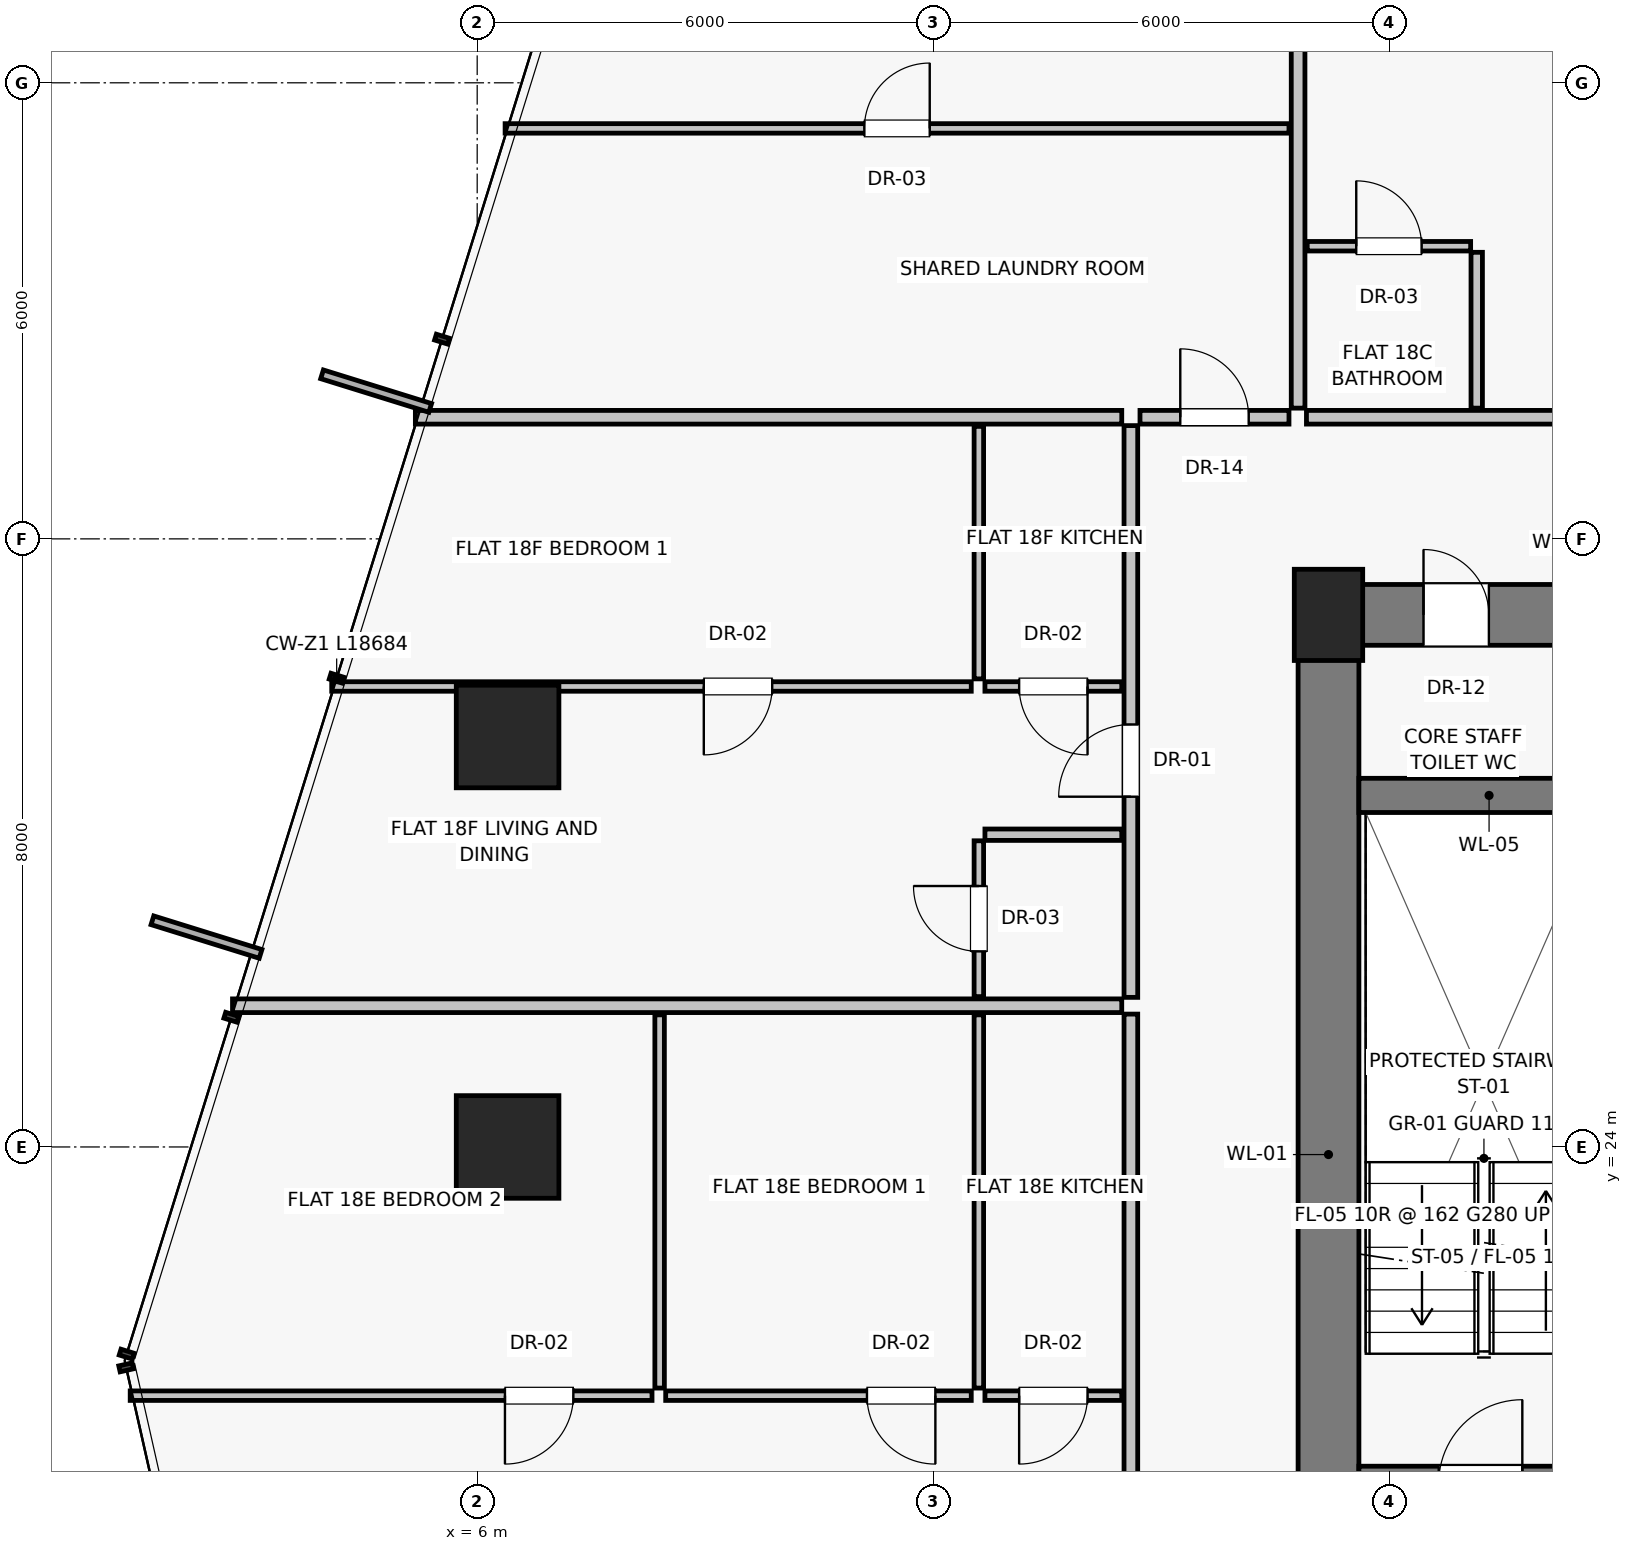
"""IFC4 building model, lengths in metres.
Left out: names, types, materials, properties, quantities, classifications, styles, units other than length and angle.
Written with IfcOpenShell. Run it as: python <this file> out.ifc"""

import sys

from ifc_helpers import new_model, si_unit, direction, frame, frame_2d, origin, origin_2d, place, context, subcontext, project, spatial, rectangle, extrude, source, transform, mapped, element, fill, save


model = new_model("IFC4")
c1 = context("Model", 3, precision=1e-05, world=origin(), true_north=direction((0.0, 1.0)))
c2 = subcontext(c1, "Body", "Model", "MODEL_VIEW")
j1 = project(units=[si_unit("LENGTHUNIT", "METRE"), si_unit("PLANEANGLEUNIT", "RADIAN")], contexts=[c1])
p1 = place(None, origin())
s1 = spatial("IfcSite", under=j1, at=p1, CompositionType="ELEMENT")
p2 = place(p1, origin())
s2 = spatial("IfcBuilding", under=s1, at=p2, CompositionType="ELEMENT")
p3 = place(p2, frame((0.0, 0.0, 67.35)))
s3 = spatial("IfcBuildingStorey", under=s2, at=p3, CompositionType="ELEMENT", Elevation=67.35)
p4 = place(p3, frame((17.2, 31.0, 0.0), z_axis=(0.0, 0.0, 1.0), x_axis=(1.0, 0.0, 0.0)))
e1 = element("IfcColumn", 1, at=p4, inside=s3, PredefinedType="PILASTER", context=c2, shape_type="SweptSolid", body=[
    extrude(rectangle(XDim=0.9, YDim=1.2, at=origin_2d()), origin(), (0.0, 0.0, 1.0), 3.25),
])
for number, where, z_axis, x_axis in (
    (2, (6.4, 29.4, 0.0), (0.0, 0.0, 1.0), (1.0, 0.0, 0.0)),
    (3, (6.4, 24.0, 0.0), (0.0, 0.0, 1.0), (1.0, 0.0, 0.0)),
):
    element("IfcColumn", number, at=place(p3, frame(where, z_axis=z_axis, x_axis=x_axis)), inside=s3, PredefinedType="COLUMN", context=c2, shape_type="SweptSolid", body=[
        extrude(rectangle(XDim=1.35, YDim=1.35, at=origin_2d()), origin(), (0.0, 0.0, 1.0), 3.25),
    ])
p5 = place(p3, frame((17.2, 16.8, 0.0), z_axis=(0.0, 0.0, 1.0), x_axis=(0.0, 1.0, 0.0)))
e4 = element("IfcWall", 4, at=p5, inside=s3, PredefinedType="SHEAR", context=c2, shape_type="SweptSolid", body=[
    extrude(rectangle(XDim=14.2, YDim=0.8, at=frame_2d((7.1, 0.0))), origin(), (0.0, 0.0, 1.0), 3.0),
])
p6 = place(p3, frame((17.2, 31.0, 0.0), z_axis=(0.0, 0.0, 1.0), x_axis=(1.0, 0.0, 0.0)))
e5 = element("IfcWall", 5, at=p6, inside=s3, PredefinedType="SHEAR", context=c2, shape_type="SweptSolid", body=[
    extrude(rectangle(XDim=3.8, YDim=0.8, at=frame_2d((1.9, 0.0))), origin(), (0.0, 0.0, 1.0), 3.0),
])
p7 = place(p6, frame((1.25, 0.0, 0.0)))
e6 = element("IfcOpeningElement", 6, at=p7, cuts=e5, PredefinedType="OPENING", context=c2, shape_type="SweptSolid", body=[
    extrude(rectangle(XDim=0.86, YDim=2.01, at=frame_2d((0.43, 1.005))), frame((0.0, 0.41, 0.0), z_axis=(0.0, -1.0, 0.0), x_axis=(1.0, 0.0, 0.0)), (0.0, 0.0, 1.0), 0.82),
])
p8 = place(p3, frame((17.6, 19.575, 0.0), z_axis=(0.0, 0.0, 1.0), x_axis=(1.0, 0.0, 0.0)))
e7 = element("IfcWall", 7, at=p8, inside=s3, PredefinedType="SHEAR", context=c2, shape_type="SweptSolid", body=[
    extrude(rectangle(XDim=3.425, YDim=0.45, at=frame_2d((1.712, 0.0))), origin(), (0.0, 0.0, 1.0), 3.0),
])
p9 = place(p8, frame((1.05, 0.0, 0.0)))
e8 = element("IfcOpeningElement", 8, at=p9, cuts=e7, PredefinedType="OPENING", context=c2, shape_type="SweptSolid", body=[
    extrude(rectangle(XDim=1.1, YDim=2.03, at=frame_2d((0.55, 1.015))), frame((0.0, 0.235, 0.0), z_axis=(0.0, -1.0, 0.0), x_axis=(1.0, 0.0, 0.0)), (0.0, 0.0, 1.0), 0.47),
])
p10 = place(p3, frame((17.6, 28.625, 0.0), z_axis=(0.0, 0.0, 1.0), x_axis=(1.0, 0.0, 0.0)))
e9 = element("IfcWall", 9, at=p10, inside=s3, PredefinedType="SHEAR", context=c2, shape_type="SweptSolid", body=[
    extrude(rectangle(XDim=3.425, YDim=0.45, at=frame_2d((1.712, 0.0))), origin(), (0.0, 0.0, 1.0), 3.0),
])
p11 = place(p3, frame((16.8, 33.72, 0.0), z_axis=(0.0, 0.0, 1.0), x_axis=(0.0, 1.0, 0.0)))
e10 = element("IfcWall", 10, at=p11, inside=s3, PredefinedType="PARTITIONING", context=c2, shape_type="SweptSolid", body=[
    extrude(rectangle(XDim=9.992, YDim=0.18, at=frame_2d((4.996, 0.0))), origin(), (0.0, 0.0, 1.0), 3.0),
])
p12 = place(p3, frame((16.91, 33.6, 0.0), z_axis=(0.0, 0.0, 1.0), x_axis=(1.0, 0.0, 0.0)))
e11 = element("IfcWall", 11, at=p12, inside=s3, PredefinedType="PARTITIONING", context=c2, shape_type="SweptSolid", body=[
    extrude(rectangle(XDim=5.638, YDim=0.18, at=frame_2d((2.819, 0.0))), origin(), (0.0, 0.0, 1.0), 3.0),
])
p13 = place(p12, frame((3.373, 0.0, 0.0)))
e12 = element("IfcOpeningElement", 12, at=p13, cuts=e11, PredefinedType="OPENING", context=c2, shape_type="SweptSolid", body=[
    extrude(rectangle(XDim=0.95, YDim=2.02, at=frame_2d((0.475, 1.01))), frame((0.0, 0.1, 0.0), z_axis=(0.0, -1.0, 0.0), x_axis=(1.0, 0.0, 0.0)), (0.0, 0.0, 1.0), 0.2),
])
p14 = place(p3, frame((19.15, 33.72, 0.0), z_axis=(0.0, 0.0, 1.0), x_axis=(0.0, 1.0, 0.0)))
e13 = element("IfcWall", 13, at=p14, inside=s3, PredefinedType="PARTITIONING", context=c2, shape_type="SweptSolid", body=[
    extrude(rectangle(XDim=2.05, YDim=0.15, at=frame_2d((1.025, 0.0))), origin(), (0.0, 0.0, 1.0), 3.0),
])
p15 = place(p3, frame((16.92, 35.85, 0.0), z_axis=(0.0, 0.0, 1.0), x_axis=(1.0, 0.0, 0.0)))
e14 = element("IfcWall", 14, at=p15, inside=s3, PredefinedType="PARTITIONING", context=c2, shape_type="SweptSolid", body=[
    extrude(rectangle(XDim=2.15, YDim=0.125, at=frame_2d((1.075, 0.0))), origin(), (0.0, 0.0, 1.0), 3.0),
])
p16 = place(p15, frame((0.645, 0.0, 0.0)))
e15 = element("IfcOpeningElement", 15, at=p16, cuts=e14, PredefinedType="OPENING", context=c2, shape_type="SweptSolid", body=[
    extrude(rectangle(XDim=0.86, YDim=2.01, at=frame_2d((0.43, 1.005))), frame((0.0, 0.073, 0.0), z_axis=(0.0, -1.0, 0.0), x_axis=(1.0, 0.0, 0.0)), (0.0, 0.0, 1.0), 0.145),
])
p17 = place(p3, frame((14.48, 33.6, 0.0), z_axis=(0.0, 0.0, 1.0), x_axis=(-1.0, 0.0, 0.0)))
e16 = element("IfcWall", 16, at=p17, inside=s3, PredefinedType="PARTITIONING", context=c2, shape_type="SweptSolid", body=[
    extrude(rectangle(XDim=9.293, YDim=0.18, at=frame_2d((4.647, 0.0))), origin(), (0.0, 0.0, 1.0), 3.0),
])
p18 = place(p3, frame((14.6, 14.31, 0.0), z_axis=(0.0, 0.0, 1.0), x_axis=(0.0, 1.0, 0.0)))
e17 = element("IfcWall", 17, at=p18, inside=s3, PredefinedType="PARTITIONING", context=c2, shape_type="SweptSolid", body=[
    extrude(rectangle(XDim=11.438, YDim=0.18, at=frame_2d((5.719, 0.0))), origin(), (0.0, 0.0, 1.0), 3.0),
])
p19 = place(p18, frame((3.804, 0.0, 0.0)))
e18 = element("IfcOpeningElement", 18, at=p19, cuts=e17, PredefinedType="OPENING", context=c2, shape_type="SweptSolid", body=[
    extrude(rectangle(XDim=0.95, YDim=2.02, at=frame_2d((0.475, 1.01))), frame((0.0, 0.1, 0.0), z_axis=(0.0, -1.0, 0.0), x_axis=(1.0, 0.0, 0.0)), (0.0, 0.0, 1.0), 0.2),
])
p20 = place(p3, frame((14.48, 20.728, 0.0), z_axis=(0.0, 0.0, 1.0), x_axis=(-1.0, 0.0, 0.0)))
e19 = element("IfcWall", 19, at=p20, inside=s3, PredefinedType="PARTITIONING", context=c2, shape_type="SweptSolid", body=[
    extrude(rectangle(XDim=1.8, YDim=0.125, at=frame_2d((0.9, 0.0))), origin(), (0.0, 0.0, 1.0), 3.0),
])
p21 = place(p20, frame((0.45, 0.0, 0.0)))
e20 = element("IfcOpeningElement", 20, at=p21, cuts=e19, PredefinedType="OPENING", context=c2, shape_type="SweptSolid", body=[
    extrude(rectangle(XDim=0.9, YDim=2.01, at=frame_2d((0.45, 1.005))), frame((0.0, 0.073, 0.0), z_axis=(0.0, -1.0, 0.0), x_axis=(1.0, 0.0, 0.0)), (0.0, 0.0, 1.0), 0.145),
])
for number, where, z_axis, x_axis in (
    (21, (12.6, 20.828, 0.0), (0.0, 0.0, 1.0), (0.0, 1.0, 0.0)),
    (22, (8.4, 20.828, 0.0), (0.0, 0.0, 1.0), (0.0, 1.0, 0.0)),
):
    element("IfcWall", number, at=place(p3, frame(where, z_axis=z_axis, x_axis=x_axis)), inside=s3, PredefinedType="PARTITIONING", context=c2, shape_type="SweptSolid", body=[
        extrude(rectangle(XDim=4.91, YDim=0.125, at=frame_2d((2.455, 0.0))), origin(), (0.0, 0.0, 1.0), 3.0),
    ])
p22 = place(p3, frame((12.5, 20.728, 0.0), z_axis=(0.0, 0.0, 1.0), x_axis=(-1.0, 0.0, 0.0)))
e23 = element("IfcWall", 23, at=p22, inside=s3, PredefinedType="PARTITIONING", context=c2, shape_type="SweptSolid", body=[
    extrude(rectangle(XDim=4.02, YDim=0.125, at=frame_2d((2.01, 0.0))), origin(), (0.0, 0.0, 1.0), 3.0),
])
p23 = place(p22, frame((0.472, 0.0, 0.0)))
e24 = element("IfcOpeningElement", 24, at=p23, cuts=e23, PredefinedType="OPENING", context=c2, shape_type="SweptSolid", body=[
    extrude(rectangle(XDim=0.9, YDim=2.01, at=frame_2d((0.45, 1.005))), frame((0.0, 0.073, 0.0), z_axis=(0.0, -1.0, 0.0), x_axis=(1.0, 0.0, 0.0)), (0.0, 0.0, 1.0), 0.145),
])
p24 = place(p3, frame((8.3, 20.728, 0.0), z_axis=(0.0, 0.0, 1.0), x_axis=(-1.0, 0.0, 0.0)))
e25 = element("IfcWall", 25, at=p24, inside=s3, PredefinedType="PARTITIONING", context=c2, shape_type="SweptSolid", body=[
    extrude(rectangle(XDim=6.865, YDim=0.125, at=frame_2d((3.433, 0.0))), origin(), (0.0, 0.0, 1.0), 3.0),
])
p25 = place(p24, frame((1.035, 0.0, 0.0)))
e26 = element("IfcOpeningElement", 26, at=p25, cuts=e25, PredefinedType="OPENING", context=c2, shape_type="SweptSolid", body=[
    extrude(rectangle(XDim=0.9, YDim=2.01, at=frame_2d((0.45, 1.005))), frame((0.0, 0.073, 0.0), z_axis=(0.0, -1.0, 0.0), x_axis=(1.0, 0.0, 0.0)), (0.0, 0.0, 1.0), 0.145),
])
p26 = place(p3, frame((14.48, 25.858, 0.0), z_axis=(0.0, 0.0, 1.0), x_axis=(-1.0, 0.0, 0.0)))
e27 = element("IfcWall", 27, at=p26, inside=s3, PredefinedType="PARTITIONING", context=c2, shape_type="SweptSolid", body=[
    extrude(rectangle(XDim=11.699, YDim=0.18, at=frame_2d((5.85, 0.0))), origin(), (0.0, 0.0, 1.0), 3.0),
])
p27 = place(p3, frame((14.6, 25.968, 0.0), z_axis=(0.0, 0.0, 1.0), x_axis=(0.0, 1.0, 0.0)))
e28 = element("IfcWall", 28, at=p27, inside=s3, PredefinedType="PARTITIONING", context=c2, shape_type="SweptSolid", body=[
    extrude(rectangle(XDim=7.522, YDim=0.18, at=frame_2d((3.761, 0.0))), origin(), (0.0, 0.0, 1.0), 3.0),
])
p28 = place(p27, frame((2.64, 0.0, 0.0)))
e29 = element("IfcOpeningElement", 29, at=p28, cuts=e28, PredefinedType="OPENING", context=c2, shape_type="SweptSolid", body=[
    extrude(rectangle(XDim=0.95, YDim=2.02, at=frame_2d((0.475, 1.01))), frame((0.0, 0.1, 0.0), z_axis=(0.0, -1.0, 0.0), x_axis=(1.0, 0.0, 0.0)), (0.0, 0.0, 1.0), 0.2),
])
p29 = place(p3, frame((14.48, 28.108, 0.0), z_axis=(0.0, 0.0, 1.0), x_axis=(-1.0, 0.0, 0.0)))
e30 = element("IfcWall", 30, at=p29, inside=s3, PredefinedType="PARTITIONING", context=c2, shape_type="SweptSolid", body=[
    extrude(rectangle(XDim=1.8, YDim=0.15, at=frame_2d((0.9, 0.0))), origin(), (0.0, 0.0, 1.0), 3.0),
])
p30 = place(p3, frame((12.6, 25.978, 0.0), z_axis=(0.0, 0.0, 1.0), x_axis=(0.0, 1.0, 0.0)))
e31 = element("IfcWall", 31, at=p30, inside=s3, PredefinedType="PARTITIONING", context=c2, shape_type="SweptSolid", body=[
    extrude(rectangle(XDim=2.05, YDim=0.125, at=frame_2d((1.025, 0.0))), origin(), (0.0, 0.0, 1.0), 3.0),
])
p31 = place(p30, frame((0.595, 0.0, 0.0)))
e32 = element("IfcOpeningElement", 32, at=p31, cuts=e31, PredefinedType="OPENING", context=c2, shape_type="SweptSolid", body=[
    extrude(rectangle(XDim=0.86, YDim=2.01, at=frame_2d((0.43, 1.005))), frame((0.0, 0.073, 0.0), z_axis=(0.0, -1.0, 0.0), x_axis=(1.0, 0.0, 0.0)), (0.0, 0.0, 1.0), 0.145),
])
p32 = place(p3, frame((14.48, 30.058, 0.0), z_axis=(0.0, 0.0, 1.0), x_axis=(-1.0, 0.0, 0.0)))
e33 = element("IfcWall", 33, at=p32, inside=s3, PredefinedType="PARTITIONING", context=c2, shape_type="SweptSolid", body=[
    extrude(rectangle(XDim=1.8, YDim=0.125, at=frame_2d((0.9, 0.0))), origin(), (0.0, 0.0, 1.0), 2.299),
])
p33 = place(p32, frame((0.45, 0.0, 0.0)))
e34 = element("IfcOpeningElement", 34, at=p33, cuts=e33, PredefinedType="OPENING", context=c2, shape_type="SweptSolid", body=[
    extrude(rectangle(XDim=0.9, YDim=2.01, at=frame_2d((0.45, 1.005))), frame((0.0, 0.073, 0.0), z_axis=(0.0, -1.0, 0.0), x_axis=(1.0, 0.0, 0.0)), (0.0, 0.0, 1.0), 0.145),
])
p34 = place(p3, frame((12.6, 30.158, 0.0), z_axis=(0.0, 0.0, 1.0), x_axis=(0.0, 1.0, 0.0)))
e35 = element("IfcWall", 35, at=p34, inside=s3, PredefinedType="PARTITIONING", context=c2, shape_type="SweptSolid", body=[
    extrude(rectangle(XDim=3.322, YDim=0.125, at=frame_2d((1.661, 0.0))), origin(), (0.0, 0.0, 1.0), 3.0),
])
p35 = place(p3, frame((12.5, 30.058, 0.0), z_axis=(0.0, 0.0, 1.0), x_axis=(-1.0, 0.0, 0.0)))
e36 = element("IfcWall", 36, at=p35, inside=s3, PredefinedType="PARTITIONING", context=c2, shape_type="SweptSolid", body=[
    extrude(rectangle(XDim=8.414, YDim=0.125, at=frame_2d((4.207, 0.0))), origin(), (0.0, 0.0, 1.0), 2.299),
])
p36 = place(p35, frame((2.619, 0.0, 0.0)))
e37 = element("IfcOpeningElement", 37, at=p36, cuts=e36, PredefinedType="OPENING", context=c2, shape_type="SweptSolid", body=[
    extrude(rectangle(XDim=0.9, YDim=2.01, at=frame_2d((0.45, 1.005))), frame((0.0, 0.073, 0.0), z_axis=(0.0, -1.0, 0.0), x_axis=(1.0, 0.0, 0.0)), (0.0, 0.0, 1.0), 0.145),
])
p37 = place(p3, frame((14.72, 33.6, 0.0), z_axis=(0.0, 0.0, 1.0), x_axis=(1.0, 0.0, 0.0)))
e38 = element("IfcWall", 38, at=p37, inside=s3, PredefinedType="PARTITIONING", context=c2, shape_type="SweptSolid", body=[
    extrude(rectangle(XDim=1.96, YDim=0.18, at=frame_2d((0.98, 0.0))), origin(), (0.0, 0.0, 1.0), 3.0),
])
p38 = place(p37, frame((0.53, 0.0, 0.0)))
e39 = element("IfcOpeningElement", 39, at=p38, cuts=e38, PredefinedType="OPENING", context=c2, shape_type="SweptSolid", body=[
    extrude(rectangle(XDim=0.9, YDim=2.01, at=frame_2d((0.45, 1.005))), frame((0.0, 0.1, 0.0), z_axis=(0.0, -1.0, 0.0), x_axis=(1.0, 0.0, 0.0)), (0.0, 0.0, 1.0), 0.2),
])
p39 = place(p3, frame((6.367, 37.4, 0.0), z_axis=(0.0, 0.0, 1.0), x_axis=(1.0, 0.0, 0.0)))
e40 = element("IfcWall", 40, at=p39, inside=s3, PredefinedType="PARTITIONING", context=c2, shape_type="SweptSolid", body=[
    extrude(rectangle(XDim=10.313, YDim=0.125, at=frame_2d((5.156, 0.0))), origin(), (0.0, 0.0, 1.0), 3.0),
])
p40 = place(p39, frame((4.726, 0.0, 0.0)))
e41 = element("IfcOpeningElement", 41, at=p40, cuts=e40, PredefinedType="OPENING", context=c2, shape_type="SweptSolid", body=[
    extrude(rectangle(XDim=0.86, YDim=2.01, at=frame_2d((0.43, 1.005))), frame((0.0, 0.073, 0.0), z_axis=(0.0, -1.0, 0.0), x_axis=(1.0, 0.0, 0.0)), (0.0, 0.0, 1.0), 0.145),
])
m1 = source(origin(), c2, "Body", "SweptSolid", [
    extrude(rectangle(XDim=0.86, YDim=2.01, at=frame_2d((0.43, 1.005))), frame((0.0, 0.025, 0.0), z_axis=(0.0, -1.0, 0.0), x_axis=(1.0, 0.0, 0.0)), (0.0, 0.0, 1.0), 0.05),
])
p41 = place(p7, origin())
e42 = element("IfcDoor", 42, at=p41, inside=s3, OperationType="SINGLE_SWING_LEFT", PredefinedType="DOOR", context=c2, shape_type="MappedRepresentation", body=[
    mapped(m1, transform((0.0, 0.0, 0.0), scale=1.0)),
])
fill(e6, e42)
p42 = place(p16, origin())
e43 = element("IfcDoor", 43, at=p42, inside=s3, OperationType="SINGLE_SWING_LEFT", PredefinedType="DOOR", context=c2, shape_type="MappedRepresentation", body=[
    mapped(m1, transform((0.0, 0.0, 0.0), scale=1.0)),
])
fill(e15, e43)
m2 = source(origin(), c2, "Body", "SweptSolid", [
    extrude(rectangle(XDim=0.9, YDim=2.01, at=frame_2d((0.45, 1.005))), frame((0.0, 0.025, 0.0), z_axis=(0.0, -1.0, 0.0), x_axis=(1.0, 0.0, 0.0)), (0.0, 0.0, 1.0), 0.05),
])
p43 = place(p21, origin())
e44 = element("IfcDoor", 44, at=p43, inside=s3, OperationType="SINGLE_SWING_RIGHT", PredefinedType="DOOR", context=c2, shape_type="MappedRepresentation", body=[
    mapped(m2, transform((0.0, 0.0, 0.0), scale=1.0)),
])
fill(e20, e44)
p44 = place(p23, origin())
e45 = element("IfcDoor", 45, at=p44, inside=s3, OperationType="SINGLE_SWING_LEFT", PredefinedType="DOOR", context=c2, shape_type="MappedRepresentation", body=[
    mapped(m2, transform((0.0, 0.0, 0.0), scale=1.0)),
])
fill(e24, e45)
p45 = place(p25, origin())
e46 = element("IfcDoor", 46, at=p45, inside=s3, OperationType="SINGLE_SWING_RIGHT", PredefinedType="DOOR", context=c2, shape_type="MappedRepresentation", body=[
    mapped(m2, transform((0.0, 0.0, 0.0), scale=1.0)),
])
fill(e26, e46)
m3 = source(origin(), c2, "Body", "SweptSolid", [
    extrude(rectangle(XDim=0.95, YDim=2.02, at=frame_2d((0.475, 1.01))), frame((0.0, 0.025, 0.0), z_axis=(0.0, -1.0, 0.0), x_axis=(1.0, 0.0, 0.0)), (0.0, 0.0, 1.0), 0.05),
])
p46 = place(p28, origin())
e47 = element("IfcDoor", 47, at=p46, inside=s3, OperationType="SINGLE_SWING_LEFT", PredefinedType="DOOR", context=c2, shape_type="MappedRepresentation", body=[
    mapped(m3, transform((0.0, 0.0, 0.0), scale=1.0)),
])
fill(e29, e47)
p47 = place(p31, origin())
e48 = element("IfcDoor", 48, at=p47, inside=s3, OperationType="SINGLE_SWING_RIGHT", PredefinedType="DOOR", context=c2, shape_type="MappedRepresentation", body=[
    mapped(m1, transform((0.0, 0.0, 0.0), scale=1.0)),
])
fill(e32, e48)
p48 = place(p33, origin())
e49 = element("IfcDoor", 49, at=p48, inside=s3, OperationType="SINGLE_SWING_LEFT", PredefinedType="DOOR", context=c2, shape_type="MappedRepresentation", body=[
    mapped(m2, transform((0.0, 0.0, 0.0), scale=1.0)),
])
fill(e34, e49)
p49 = place(p36, origin())
e50 = element("IfcDoor", 50, at=p49, inside=s3, OperationType="SINGLE_SWING_RIGHT", PredefinedType="DOOR", context=c2, shape_type="MappedRepresentation", body=[
    mapped(m2, transform((0.0, 0.0, 0.0), scale=1.0)),
])
fill(e37, e50)
p50 = place(p38, origin())
e51 = element("IfcDoor", 51, at=p50, inside=s3, OperationType="SINGLE_SWING_LEFT", PredefinedType="DOOR", context=c2, shape_type="MappedRepresentation", body=[
    mapped(m2, transform((0.0, 0.0, 0.0), scale=1.0)),
])
fill(e39, e51)
p51 = place(p40, origin())
e52 = element("IfcDoor", 52, at=p51, inside=s3, OperationType="SINGLE_SWING_RIGHT", PredefinedType="DOOR", context=c2, shape_type="MappedRepresentation", body=[
    mapped(m1, transform((0.0, 0.0, 0.0), scale=1.0)),
])
fill(e41, e52)
save(model, sys.argv[1])
